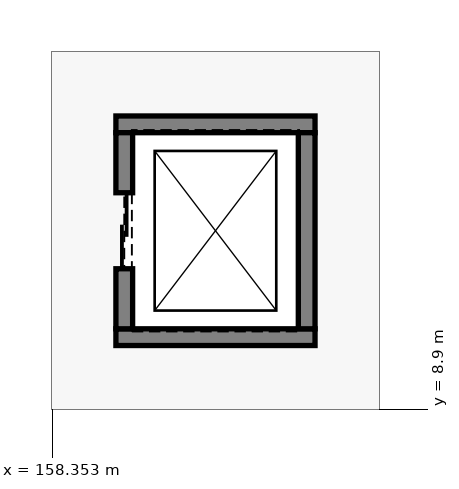
"""IFC4 building model, lengths in metres.
Left out: names, types, materials, properties, quantities, classifications, styles, units other than length and angle.
Written with IfcOpenShell. Run it as: python <this file> out.ifc"""

import sys

from ifc_helpers import new_model, si_unit, direction, frame, frame_2d, origin, place, context, subcontext, project, spatial, rectangle, extrude, element, fill, save


model = new_model("IFC4")
c1 = context("Model", 3, precision=1e-05, world=origin(), true_north=direction((0.0, 1.0)))
c2 = subcontext(c1, "Body", "Model", "MODEL_VIEW")
j1 = project(units=[si_unit("LENGTHUNIT", "METRE"), si_unit("PLANEANGLEUNIT", "RADIAN")], contexts=[c1])
p1 = place(None, origin())
s1 = spatial("IfcSite", under=j1, at=p1, CompositionType="ELEMENT")
p2 = place(p1, origin())
s2 = spatial("IfcBuilding", under=s1, at=p2, CompositionType="ELEMENT")
p3 = place(p2, frame((0.0, 0.0, 4.8)))
s3 = spatial("IfcBuildingStorey", under=s2, at=p3, CompositionType="ELEMENT", Elevation=4.8)
for number, where, z_axis, x_axis in (
    (1, (159.19, 9.85, 0.0), (0.0, 0.0, 1.0), (1.0, 0.0, 0.0)),
    (2, (159.19, 12.65, 0.0), (0.0, 0.0, 1.0), (1.0, 0.0, 0.0)),
):
    element("IfcWall", number, at=place(p3, frame(where, z_axis=z_axis, x_axis=x_axis)), inside=s3, PredefinedType="SOLIDWALL", context=c2, shape_type="SweptSolid", body=[
        extrude(rectangle(XDim=2.62, YDim=0.22, at=frame_2d((1.31, 0.0))), origin(), (0.0, 0.0, 1.0), 3.92),
    ])
p4 = place(p3, frame((159.3, 9.96, 0.0), z_axis=(0.0, 0.0, 1.0), x_axis=(0.0, 1.0, 0.0)))
e3 = element("IfcWall", 3, at=p4, inside=s3, PredefinedType="SOLIDWALL", context=c2, shape_type="SweptSolid", body=[
    extrude(rectangle(XDim=2.58, YDim=0.22, at=frame_2d((1.29, 0.0))), origin(), (0.0, 0.0, 1.0), 3.92),
])
p5 = place(p4, frame((0.79, 0.0, 0.0)))
e4 = element("IfcOpeningElement", 4, at=p5, cuts=e3, PredefinedType="OPENING", context=c2, shape_type="SweptSolid", body=[
    extrude(rectangle(XDim=1.0, YDim=2.15, at=frame_2d((0.5, 1.075))), frame((0.0, 0.12, 0.0), z_axis=(0.0, -1.0, 0.0), x_axis=(1.0, 0.0, 0.0)), (0.0, 0.0, 1.0), 0.24),
])
p6 = place(p3, frame((161.7, 9.96, 0.0), z_axis=(0.0, 0.0, 1.0), x_axis=(0.0, 1.0, 0.0)))
e5 = element("IfcWall", 5, at=p6, inside=s3, PredefinedType="SOLIDWALL", context=c2, shape_type="SweptSolid", body=[
    extrude(rectangle(XDim=2.58, YDim=0.22, at=frame_2d((1.29, 0.0))), origin(), (0.0, 0.0, 1.0), 3.92),
])
p7 = place(p5, origin())
e6 = element("IfcDoor", 6, at=p7, inside=s3, OperationType="SLIDING_TO_LEFT", PredefinedType="DOOR", context=c2, shape_type="SweptSolid", body=[
    extrude(rectangle(XDim=1.0, YDim=2.15, at=frame_2d((0.5, 1.075))), frame((0.0, 0.025, 0.0), z_axis=(0.0, -1.0, 0.0), x_axis=(1.0, 0.0, 0.0)), (0.0, 0.0, 1.0), 0.05),
])
fill(e4, e6)
save(model, sys.argv[1])
